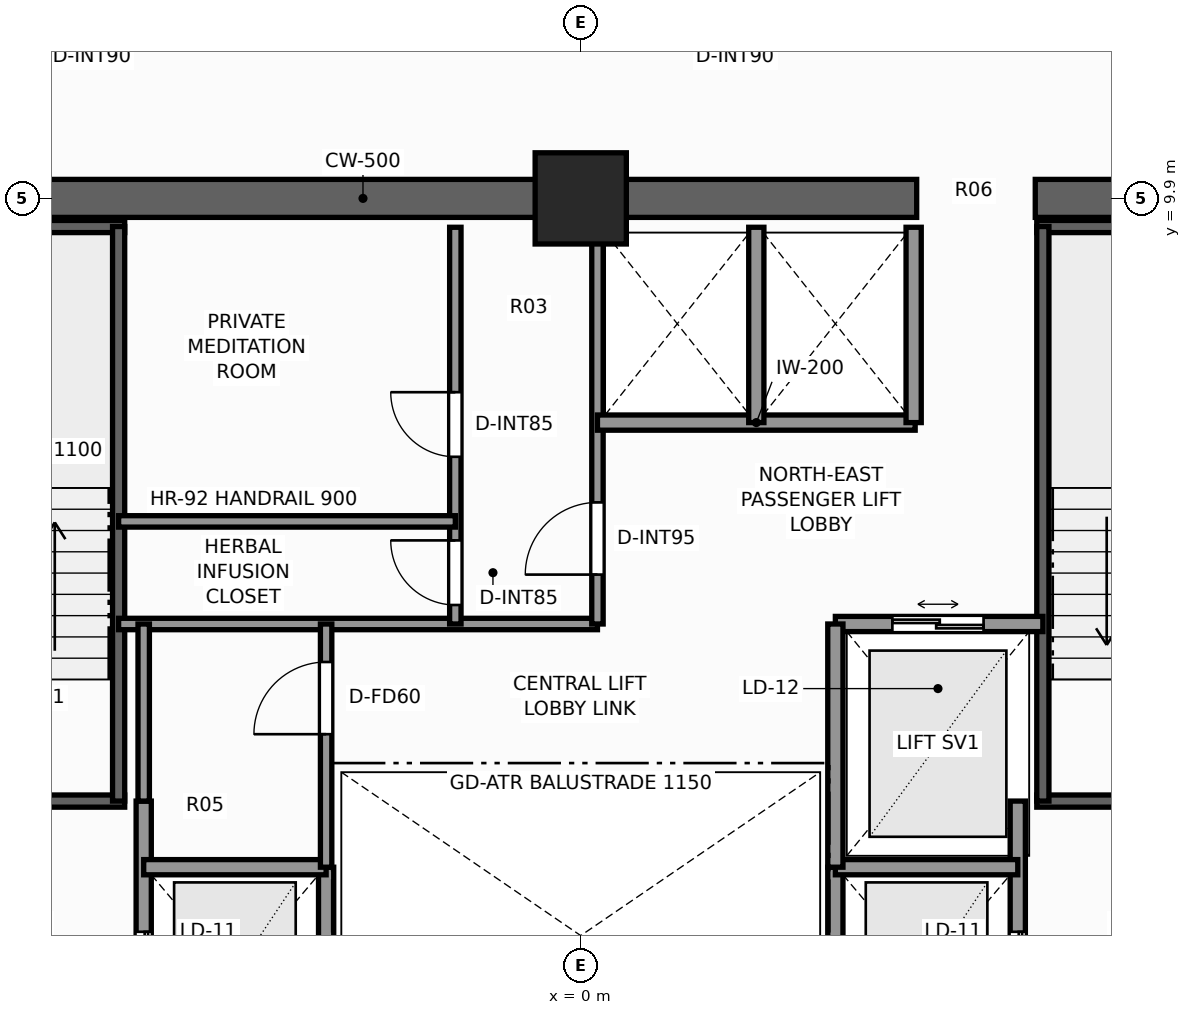
"""IFC4 building model, lengths in metres.
Left out: names, types, materials, properties, quantities, classifications, styles, units other than length and angle.
Written with IfcOpenShell. Run it as: python <this file> out.ifc"""

import sys

from ifc_helpers import new_model, si_unit, direction, frame, frame_2d, origin, origin_2d, place, context, subcontext, project, spatial, rectangle, extrude, element, fill, save


model = new_model("IFC4")
c1 = context("Model", 3, precision=1e-05, world=origin(), true_north=direction((0.0, 1.0)))
c2 = subcontext(c1, "Body", "Model", "MODEL_VIEW")
j1 = project(units=[si_unit("LENGTHUNIT", "METRE"), si_unit("PLANEANGLEUNIT", "RADIAN")], contexts=[c1])
p1 = place(None, origin())
s1 = spatial("IfcSite", under=j1, at=p1, CompositionType="ELEMENT")
p2 = place(p1, origin())
s2 = spatial("IfcBuilding", under=s1, at=p2, CompositionType="ELEMENT")
p3 = place(p2, frame((0.0, 0.0, 125.0)))
s3 = spatial("IfcBuildingStorey", under=s2, at=p3, CompositionType="ELEMENT", Elevation=125.0)
p4 = place(p3, frame((-10.15, 9.9, 0.0), z_axis=(0.0, 0.0, 1.0), x_axis=(1.0, 0.0, 0.0)))
e1 = element("IfcWall", 1, at=p4, inside=s3, PredefinedType="SHEAR", context=c2, shape_type="SweptSolid", body=[
    extrude(rectangle(XDim=14.57, YDim=0.5, at=frame_2d((7.285, 0.0))), origin(), (0.0, 0.0, 1.0), 3.3),
])
p5 = place(p3, frame((5.98, 9.9, 0.0), z_axis=(0.0, 0.0, 1.0), x_axis=(1.0, 0.0, 0.0)))
e2 = element("IfcWall", 2, at=p5, inside=s3, PredefinedType="SHEAR", context=c2, shape_type="SweptSolid", body=[
    extrude(rectangle(XDim=4.17, YDim=0.5, at=frame_2d((2.085, 0.0))), origin(), (0.0, 0.0, 1.0), 3.3),
])
p6 = place(p3, frame((0.0, 9.9, 0.0), z_axis=(0.0, 0.0, 1.0), x_axis=(1.0, 0.0, 0.0)))
e3 = element("IfcColumn", 3, at=p6, inside=s3, PredefinedType="COLUMN", context=c2, shape_type="SweptSolid", body=[
    extrude(rectangle(XDim=1.2, YDim=1.2, at=origin_2d()), origin(), (0.0, 0.0, 1.0), 3.3),
])
p7 = place(p3, frame((-9.52, 1.97, 0.0), z_axis=(0.0, 0.0, 1.0), x_axis=(1.0, 0.0, 0.0)))
e4 = element("IfcWall", 4, at=p7, inside=s3, PredefinedType="SHEAR", context=c2, shape_type="SweptSolid", body=[
    extrude(rectangle(XDim=3.52, YDim=0.16, at=frame_2d((1.76, 0.0))), origin(), (0.0, 0.0, 1.0), 3.3),
])
p8 = place(p7, frame((1.15, 0.0, 0.0)))
e5 = element("IfcOpeningElement", 5, at=p8, cuts=e4, PredefinedType="OPENING", context=c2, shape_type="SweptSolid", body=[
    extrude(rectangle(XDim=1.1, YDim=2.2, at=frame_2d((0.55, 1.1))), frame((0.0, 0.09, 0.0), z_axis=(0.0, -1.0, 0.0), x_axis=(1.0, 0.0, 0.0)), (0.0, 0.0, 1.0), 0.18),
])
p9 = place(p3, frame((-9.52, 9.53, 0.0), z_axis=(0.0, 0.0, 1.0), x_axis=(1.0, 0.0, 0.0)))
e6 = element("IfcWall", 6, at=p9, inside=s3, PredefinedType="SHEAR", context=c2, shape_type="SweptSolid", body=[
    extrude(rectangle(XDim=3.52, YDim=0.16, at=frame_2d((1.76, 0.0))), origin(), (0.0, 0.0, 1.0), 3.3),
])
p10 = place(p3, frame((-6.08, 1.97, 0.0), z_axis=(0.0, 0.0, 1.0), x_axis=(0.0, 1.0, 0.0)))
e7 = element("IfcWall", 7, at=p10, inside=s3, PredefinedType="SHEAR", context=c2, shape_type="SweptSolid", body=[
    extrude(rectangle(XDim=7.56, YDim=0.16, at=frame_2d((3.78, 0.0))), origin(), (0.0, 0.0, 1.0), 3.3),
])
p11 = place(p3, frame((6.0, 1.97, 0.0), z_axis=(0.0, 0.0, 1.0), x_axis=(1.0, 0.0, 0.0)))
e8 = element("IfcWall", 8, at=p11, inside=s3, PredefinedType="SHEAR", context=c2, shape_type="SweptSolid", body=[
    extrude(rectangle(XDim=3.52, YDim=0.16, at=frame_2d((1.76, 0.0))), origin(), (0.0, 0.0, 1.0), 3.3),
])
p12 = place(p11, frame((1.15, 0.0, 0.0)))
e9 = element("IfcOpeningElement", 9, at=p12, cuts=e8, PredefinedType="OPENING", context=c2, shape_type="SweptSolid", body=[
    extrude(rectangle(XDim=1.1, YDim=2.2, at=frame_2d((0.55, 1.1))), frame((0.0, 0.09, 0.0), z_axis=(0.0, -1.0, 0.0), x_axis=(1.0, 0.0, 0.0)), (0.0, 0.0, 1.0), 0.18),
])
p13 = place(p3, frame((6.0, 9.53, 0.0), z_axis=(0.0, 0.0, 1.0), x_axis=(1.0, 0.0, 0.0)))
e10 = element("IfcWall", 10, at=p13, inside=s3, PredefinedType="SHEAR", context=c2, shape_type="SweptSolid", body=[
    extrude(rectangle(XDim=3.52, YDim=0.16, at=frame_2d((1.76, 0.0))), origin(), (0.0, 0.0, 1.0), 3.3),
])
p14 = place(p3, frame((6.08, 1.97, 0.0), z_axis=(0.0, 0.0, 1.0), x_axis=(0.0, 1.0, 0.0)))
e11 = element("IfcWall", 11, at=p14, inside=s3, PredefinedType="SHEAR", context=c2, shape_type="SweptSolid", body=[
    extrude(rectangle(XDim=7.56, YDim=0.16, at=frame_2d((3.78, 0.0))), origin(), (0.0, 0.0, 1.0), 3.3),
])
p15 = place(p3, frame((-5.75, -3.6, 0.0), z_axis=(0.0, 0.0, 1.0), x_axis=(0.0, 1.0, 0.0)))
e12 = element("IfcWall", 12, at=p15, inside=s3, PredefinedType="SOLIDWALL", context=c2, shape_type="SweptSolid", body=[
    extrude(rectangle(XDim=5.57, YDim=0.2, at=frame_2d((2.785, 0.0))), origin(), (0.0, 0.0, 1.0), 2.735),
])
p16 = place(p15, frame((2.75, 0.0, 0.0)))
e13 = element("IfcOpeningElement", 13, at=p16, cuts=e12, PredefinedType="OPENING", context=c2, shape_type="SweptSolid", body=[
    extrude(rectangle(XDim=1.1, YDim=2.2, at=frame_2d((0.55, 1.1))), frame((0.0, 0.11, 0.0), z_axis=(0.0, -1.0, 0.0), x_axis=(1.0, 0.0, 0.0)), (0.0, 0.0, 1.0), 0.22),
])
p17 = place(p3, frame((-3.35, -1.7, 0.0), z_axis=(0.0, 0.0, 1.0), x_axis=(0.0, 1.0, 0.0)))
e14 = element("IfcWall", 14, at=p17, inside=s3, PredefinedType="SOLIDWALL", context=c2, shape_type="SweptSolid", body=[
    extrude(rectangle(XDim=2.8, YDim=0.2, at=frame_2d((1.4, 0.0))), origin(), (0.0, 0.0, 1.0), 2.735),
])
p18 = place(p3, frame((-5.75, 1.1, 0.0), z_axis=(0.0, 0.0, 1.0), x_axis=(1.0, 0.0, 0.0)))
e15 = element("IfcWall", 15, at=p18, inside=s3, PredefinedType="SOLIDWALL", context=c2, shape_type="SweptSolid", body=[
    extrude(rectangle(XDim=2.4, YDim=0.2, at=frame_2d((1.2, 0.0))), origin(), (0.0, 0.0, 1.0), 3.1),
])
p19 = place(p3, frame((5.75, -3.6, 0.0), z_axis=(0.0, 0.0, 1.0), x_axis=(0.0, 1.0, 0.0)))
e16 = element("IfcWall", 16, at=p19, inside=s3, PredefinedType="SOLIDWALL", context=c2, shape_type="SweptSolid", body=[
    extrude(rectangle(XDim=5.57, YDim=0.2, at=frame_2d((2.785, 0.0))), origin(), (0.0, 0.0, 1.0), 2.735),
])
p20 = place(p19, frame((2.75, 0.0, 0.0)))
e17 = element("IfcOpeningElement", 17, at=p20, cuts=e16, PredefinedType="OPENING", context=c2, shape_type="SweptSolid", body=[
    extrude(rectangle(XDim=1.1, YDim=2.2, at=frame_2d((0.55, 1.1))), frame((0.0, 0.11, 0.0), z_axis=(0.0, -1.0, 0.0), x_axis=(1.0, 0.0, 0.0)), (0.0, 0.0, 1.0), 0.22),
])
p21 = place(p3, frame((3.35, -1.7, 0.0), z_axis=(0.0, 0.0, 1.0), x_axis=(0.0, 1.0, 0.0)))
e18 = element("IfcWall", 18, at=p21, inside=s3, PredefinedType="SOLIDWALL", context=c2, shape_type="SweptSolid", body=[
    extrude(rectangle(XDim=2.8, YDim=0.2, at=frame_2d((1.4, 0.0))), origin(), (0.0, 0.0, 1.0), 2.735),
])
p22 = place(p3, frame((3.35, 1.1, 0.0), z_axis=(0.0, 0.0, 1.0), x_axis=(1.0, 0.0, 0.0)))
e19 = element("IfcWall", 19, at=p22, inside=s3, PredefinedType="SOLIDWALL", context=c2, shape_type="SweptSolid", body=[
    extrude(rectangle(XDim=2.4, YDim=0.2, at=frame_2d((1.2, 0.0))), origin(), (0.0, 0.0, 1.0), 3.1),
])
p23 = place(p3, frame((3.35, 4.3, 0.0), z_axis=(0.0, 0.0, 1.0), x_axis=(1.0, 0.0, 0.0)))
e20 = element("IfcWall", 20, at=p23, inside=s3, PredefinedType="SOLIDWALL", context=c2, shape_type="SweptSolid", body=[
    extrude(rectangle(XDim=2.73, YDim=0.2, at=frame_2d((1.365, 0.0))), origin(), (0.0, 0.0, 1.0), 3.1),
])
p24 = place(p23, frame((0.75, 0.0, 0.0)))
e21 = element("IfcOpeningElement", 21, at=p24, cuts=e20, PredefinedType="OPENING", context=c2, shape_type="SweptSolid", body=[
    extrude(rectangle(XDim=1.2, YDim=2.25, at=frame_2d((0.6, 1.125))), frame((0.0, 0.11, 0.0), z_axis=(0.0, -1.0, 0.0), x_axis=(1.0, 0.0, 0.0)), (0.0, 0.0, 1.0), 0.22),
])
p25 = place(p3, frame((3.35, 1.1, 0.0), z_axis=(0.0, 0.0, 1.0), x_axis=(0.0, 1.0, 0.0)))
e22 = element("IfcWall", 22, at=p25, inside=s3, PredefinedType="SOLIDWALL", context=c2, shape_type="SweptSolid", body=[
    extrude(rectangle(XDim=3.2, YDim=0.2, at=frame_2d((1.6, 0.0))), origin(), (0.0, 0.0, 1.0), 2.735),
])
p26 = place(p3, frame((-6.08, 4.3, 0.0), z_axis=(0.0, 0.0, 1.0), x_axis=(1.0, 0.0, 0.0)))
e23 = element("IfcWall", 23, at=p26, inside=s3, PredefinedType="PARTITIONING", context=c2, shape_type="SweptSolid", body=[
    extrude(rectangle(XDim=6.3, YDim=0.15, at=frame_2d((3.15, 0.0))), origin(), (0.0, 0.0, 1.0), 3.1),
])
p27 = place(p3, frame((0.22, 4.3, 0.0), z_axis=(0.0, 0.0, 1.0), x_axis=(0.0, 1.0, 0.0)))
e24 = element("IfcWall", 24, at=p27, inside=s3, PredefinedType="PARTITIONING", context=c2, shape_type="SweptSolid", body=[
    extrude(rectangle(XDim=5.22, YDim=0.15, at=frame_2d((2.61, 0.0))), origin(), (0.0, 0.0, 1.0), 3.1),
])
p28 = place(p27, frame((0.65, 0.0, 0.0)))
e25 = element("IfcOpeningElement", 25, at=p28, cuts=e24, PredefinedType="OPENING", context=c2, shape_type="SweptSolid", body=[
    extrude(rectangle(XDim=0.95, YDim=2.06, at=frame_2d((0.475, 1.03))), frame((0.0, 0.085, 0.0), z_axis=(0.0, -1.0, 0.0), x_axis=(1.0, 0.0, 0.0)), (0.0, 0.0, 1.0), 0.17),
])
p29 = place(p3, frame((-1.65, 4.3, 0.0), z_axis=(0.0, 0.0, 1.0), x_axis=(0.0, 1.0, 0.0)))
e26 = element("IfcWall", 26, at=p29, inside=s3, PredefinedType="PARTITIONING", context=c2, shape_type="SweptSolid", body=[
    extrude(rectangle(XDim=5.22, YDim=0.15, at=frame_2d((2.61, 0.0))), origin(), (0.0, 0.0, 1.0), 3.1),
])
p30 = place(p29, frame((2.2, 0.0, 0.0)))
e27 = element("IfcOpeningElement", 27, at=p30, cuts=e26, PredefinedType="OPENING", context=c2, shape_type="SweptSolid", body=[
    extrude(rectangle(XDim=0.85, YDim=2.03, at=frame_2d((0.425, 1.015))), frame((0.0, 0.085, 0.0), z_axis=(0.0, -1.0, 0.0), x_axis=(1.0, 0.0, 0.0)), (0.0, 0.0, 1.0), 0.17),
])
p31 = place(p29, frame((0.25, 0.0, 0.0)))
e28 = element("IfcOpeningElement", 28, at=p31, cuts=e26, PredefinedType="OPENING", context=c2, shape_type="SweptSolid", body=[
    extrude(rectangle(XDim=0.85, YDim=2.03, at=frame_2d((0.425, 1.015))), frame((0.0, 0.085, 0.0), z_axis=(0.0, -1.0, 0.0), x_axis=(1.0, 0.0, 0.0)), (0.0, 0.0, 1.0), 0.17),
])
p32 = place(p3, frame((-6.08, 5.65, 0.0), z_axis=(0.0, 0.0, 1.0), x_axis=(1.0, 0.0, 0.0)))
e29 = element("IfcWall", 29, at=p32, inside=s3, PredefinedType="PARTITIONING", context=c2, shape_type="SweptSolid", body=[
    extrude(rectangle(XDim=4.43, YDim=0.15, at=frame_2d((2.215, 0.0))), origin(), (0.0, 0.0, 1.0), 3.1),
])
p33 = place(p3, frame((0.22, 6.95, 0.0), z_axis=(0.0, 0.0, 1.0), x_axis=(1.0, 0.0, 0.0)))
e30 = element("IfcWall", 30, at=p33, inside=s3, PredefinedType="SOLIDWALL", context=c2, shape_type="SweptSolid", body=[
    extrude(rectangle(XDim=4.18, YDim=0.2, at=frame_2d((2.09, 0.0))), origin(), (0.0, 0.0, 1.0), 3.1),
])
for number, where, z_axis, x_axis in (
    (31, (4.38, 6.95, 0.0), (0.0, 0.0, 1.0), (0.0, 1.0, 0.0)),
    (32, (2.31, 6.95, 0.0), (0.0, 0.0, 1.0), (0.0, 1.0, 0.0)),
):
    element("IfcWall", number, at=place(p3, frame(where, z_axis=z_axis, x_axis=x_axis)), inside=s3, PredefinedType="SOLIDWALL", context=c2, shape_type="SweptSolid", body=[
        extrude(rectangle(XDim=2.57, YDim=0.2, at=frame_2d((1.285, 0.0))), origin(), (0.0, 0.0, 1.0), 3.1),
    ])
p34 = place(p3, frame((-3.35, 1.1, 0.0), z_axis=(0.0, 0.0, 1.0), x_axis=(0.0, 1.0, 0.0)))
e33 = element("IfcWall", 33, at=p34, inside=s3, PredefinedType="PARTITIONING", context=c2, shape_type="SweptSolid", body=[
    extrude(rectangle(XDim=3.2, YDim=0.15, at=frame_2d((1.6, 0.0))), origin(), (0.0, 0.0, 1.0), 2.735),
])
p35 = place(p34, frame((1.75, 0.0, 0.0)))
e34 = element("IfcOpeningElement", 34, at=p35, cuts=e33, PredefinedType="OPENING", context=c2, shape_type="SweptSolid", body=[
    extrude(rectangle(XDim=0.95, YDim=2.06, at=frame_2d((0.475, 1.03))), frame((0.0, 0.085, 0.0), z_axis=(0.0, -1.0, 0.0), x_axis=(1.0, 0.0, 0.0)), (0.0, 0.0, 1.0), 0.17),
])
p36 = place(p3, frame((-5.75, 1.97, 0.0), z_axis=(0.0, 0.0, 1.0), x_axis=(0.0, 1.0, 0.0)))
e35 = element("IfcWall", 35, at=p36, inside=s3, PredefinedType="PARTITIONING", context=c2, shape_type="SweptSolid", body=[
    extrude(rectangle(XDim=2.33, YDim=0.15, at=frame_2d((1.165, 0.0))), origin(), (0.0, 0.0, 1.0), 2.735),
])
p37 = place(p16, origin())
e36 = element("IfcDoor", 36, at=p37, inside=s3, OperationType="DOUBLE_DOOR_SLIDING", PredefinedType="DOOR", context=c2, shape_type="SweptSolid", body=[
    extrude(rectangle(XDim=1.1, YDim=2.2, at=frame_2d((0.55, 1.1))), frame((0.0, 0.025, 0.0), z_axis=(0.0, -1.0, 0.0), x_axis=(1.0, 0.0, 0.0)), (0.0, 0.0, 1.0), 0.05),
])
fill(e13, e36)
p38 = place(p20, origin())
e37 = element("IfcDoor", 37, at=p38, inside=s3, OperationType="DOUBLE_DOOR_SLIDING", PredefinedType="DOOR", context=c2, shape_type="SweptSolid", body=[
    extrude(rectangle(XDim=1.1, YDim=2.2, at=frame_2d((0.55, 1.1))), frame((0.0, 0.025, 0.0), z_axis=(0.0, -1.0, 0.0), x_axis=(1.0, 0.0, 0.0)), (0.0, 0.0, 1.0), 0.05),
])
fill(e17, e37)
p39 = place(p24, origin())
e38 = element("IfcDoor", 38, at=p39, inside=s3, OperationType="DOUBLE_DOOR_SLIDING", PredefinedType="DOOR", context=c2, shape_type="SweptSolid", body=[
    extrude(rectangle(XDim=1.2, YDim=2.25, at=frame_2d((0.6, 1.125))), frame((0.0, 0.025, 0.0), z_axis=(0.0, -1.0, 0.0), x_axis=(1.0, 0.0, 0.0)), (0.0, 0.0, 1.0), 0.05),
])
fill(e21, e38)
p40 = place(p28, origin())
e39 = element("IfcDoor", 39, at=p40, inside=s3, OperationType="SINGLE_SWING_LEFT", PredefinedType="DOOR", context=c2, shape_type="SweptSolid", body=[
    extrude(rectangle(XDim=0.95, YDim=2.06, at=frame_2d((0.475, 1.03))), frame((0.0, 0.025, 0.0), z_axis=(0.0, -1.0, 0.0), x_axis=(1.0, 0.0, 0.0)), (0.0, 0.0, 1.0), 0.05),
])
fill(e25, e39)
p41 = place(p30, origin())
e40 = element("IfcDoor", 40, at=p41, inside=s3, OperationType="SINGLE_SWING_RIGHT", PredefinedType="DOOR", context=c2, shape_type="SweptSolid", body=[
    extrude(rectangle(XDim=0.85, YDim=2.03, at=frame_2d((0.425, 1.015))), frame((0.0, 0.025, 0.0), z_axis=(0.0, -1.0, 0.0), x_axis=(1.0, 0.0, 0.0)), (0.0, 0.0, 1.0), 0.05),
])
fill(e27, e40)
p42 = place(p31, origin())
e41 = element("IfcDoor", 41, at=p42, inside=s3, OperationType="SINGLE_SWING_RIGHT", PredefinedType="DOOR", context=c2, shape_type="SweptSolid", body=[
    extrude(rectangle(XDim=0.85, YDim=2.03, at=frame_2d((0.425, 1.015))), frame((0.0, 0.025, 0.0), z_axis=(0.0, -1.0, 0.0), x_axis=(1.0, 0.0, 0.0)), (0.0, 0.0, 1.0), 0.05),
])
fill(e28, e41)
p43 = place(p35, origin())
e42 = element("IfcDoor", 42, at=p43, inside=s3, OperationType="SINGLE_SWING_LEFT", PredefinedType="DOOR", context=c2, shape_type="SweptSolid", body=[
    extrude(rectangle(XDim=0.95, YDim=2.06, at=frame_2d((0.475, 1.03))), frame((0.0, 0.025, 0.0), z_axis=(0.0, -1.0, 0.0), x_axis=(1.0, 0.0, 0.0)), (0.0, 0.0, 1.0), 0.05),
])
fill(e34, e42)
save(model, sys.argv[1])
